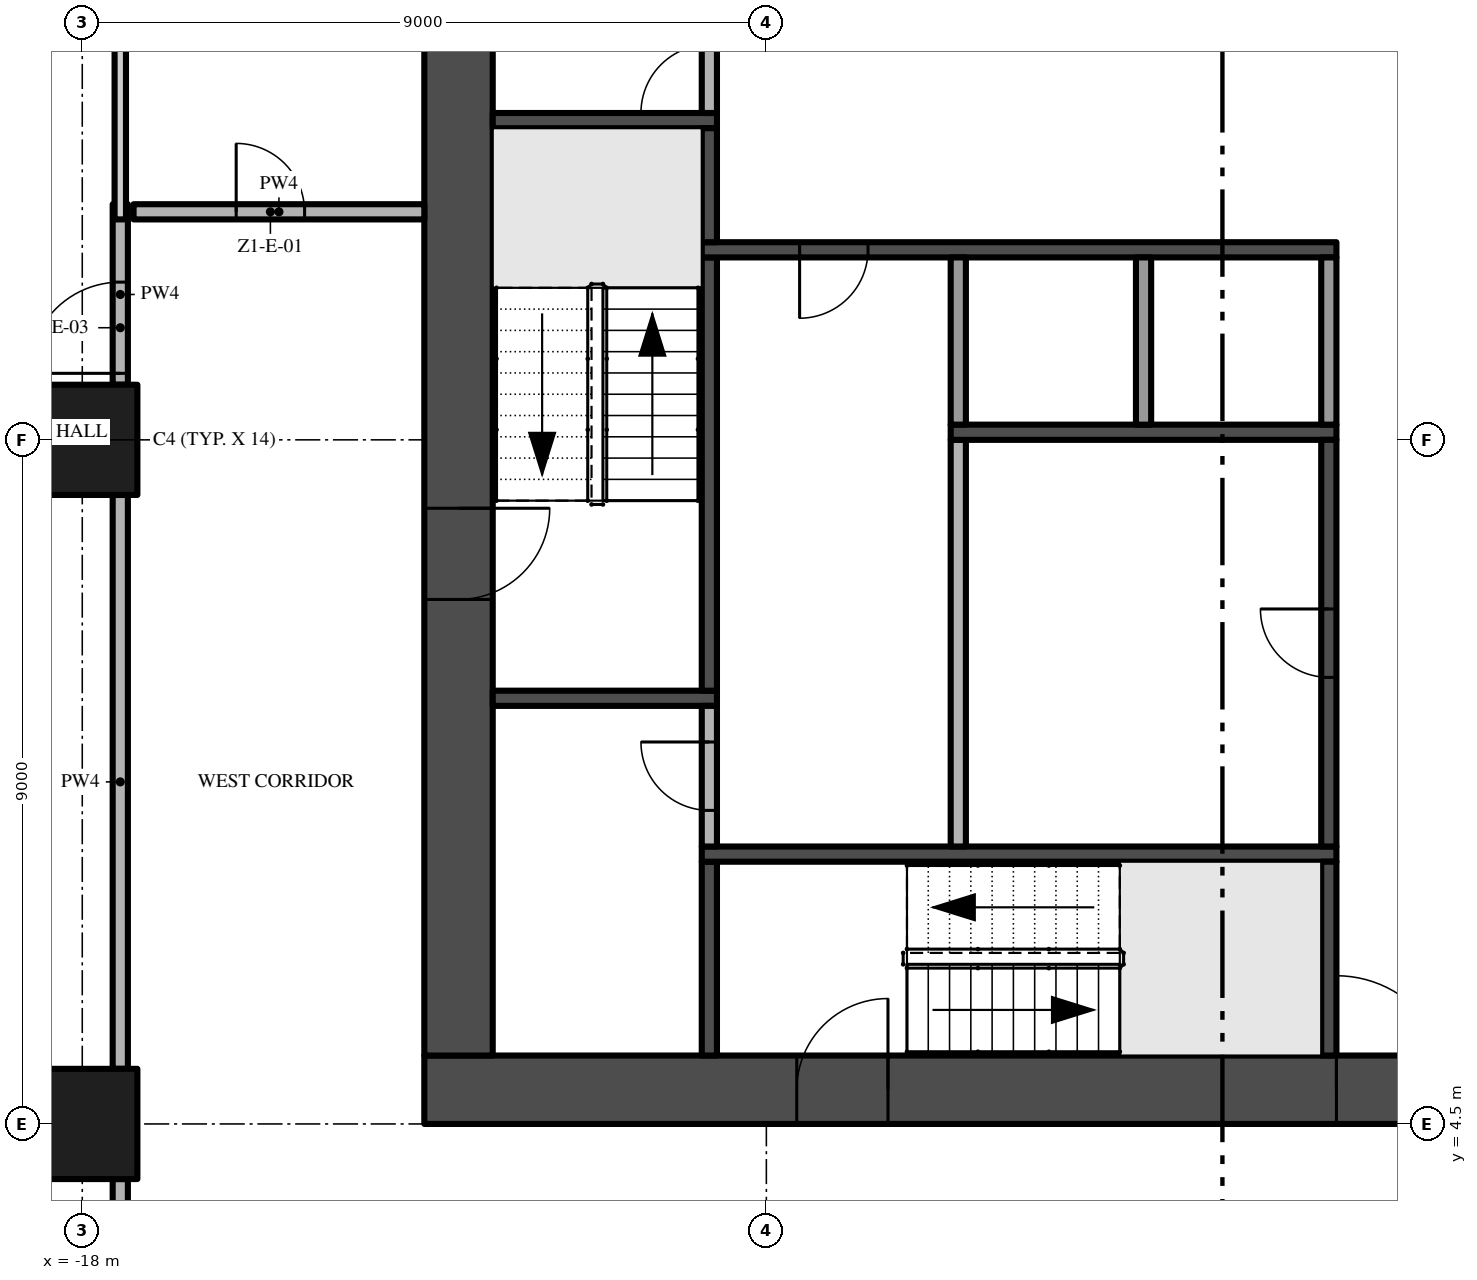
"""IFC4 building model, lengths in metres.
Left out: names, types, materials, properties, quantities, classifications, styles, units other than length and angle.
Written with IfcOpenShell. Run it as: python <this file> out.ifc"""

import sys

from ifc_helpers import new_model, si_unit, direction, frame, frame_2d, origin, origin_2d, place, context, subcontext, project, spatial, rectangle, extrude, element, fill, save


model = new_model("IFC4")
c1 = context("Model", 3, precision=1e-05, world=origin(), true_north=direction((0.0, 1.0)))
c2 = subcontext(c1, "Body", "Model", "MODEL_VIEW")
j1 = project(units=[si_unit("LENGTHUNIT", "METRE"), si_unit("PLANEANGLEUNIT", "RADIAN")], contexts=[c1])
p1 = place(None, origin())
s1 = spatial("IfcSite", under=j1, at=p1, CompositionType="ELEMENT")
p2 = place(p1, origin())
s2 = spatial("IfcBuilding", under=s1, at=p2, CompositionType="ELEMENT")
p3 = place(p2, frame((0.0, 0.0, 60.6)))
s3 = spatial("IfcBuildingStorey", under=s2, at=p3, CompositionType="ELEMENT", Elevation=60.6)
p4 = place(p3, frame((-13.5, 4.95, -0.3), z_axis=(0.0, 0.0, 1.0), x_axis=(1.0, 0.0, 0.0)))
e1 = element("IfcWall", 1, at=p4, inside=s3, PredefinedType="SHEAR", context=c2, shape_type="SweptSolid", body=[
    extrude(rectangle(XDim=27.0, YDim=0.9, at=frame_2d((13.5, 0.0))), origin(), (0.0, 0.0, 1.0), 3.8),
])
p5 = place(p4, frame((12.0, 0.0, 0.3)))
e2 = element("IfcOpeningElement", 2, at=p5, cuts=e1, PredefinedType="OPENING", context=c2, shape_type="SweptSolid", body=[
    extrude(rectangle(XDim=3.0, YDim=2.4, at=frame_2d((1.5, 1.2))), frame((0.0, 0.46, 0.0), z_axis=(0.0, -1.0, 0.0), x_axis=(1.0, 0.0, 0.0)), (0.0, 0.0, 1.0), 0.92),
])
p6 = place(p4, frame((4.9, 0.0, 0.3)))
e3 = element("IfcOpeningElement", 3, at=p6, cuts=e1, PredefinedType="OPENING", context=c2, shape_type="SweptSolid", body=[
    extrude(rectangle(XDim=1.2, YDim=2.2, at=frame_2d((0.6, 1.1))), frame((0.0, 0.46, 0.0), z_axis=(0.0, -1.0, 0.0), x_axis=(1.0, 0.0, 0.0)), (0.0, 0.0, 1.0), 0.92),
])
p7 = place(p4, frame((20.75, 0.0, 0.3)))
e4 = element("IfcOpeningElement", 4, at=p7, cuts=e1, PredefinedType="OPENING", context=c2, shape_type="SweptSolid", body=[
    extrude(rectangle(XDim=1.5, YDim=2.2, at=frame_2d((0.75, 1.1))), frame((0.0, 0.46, 0.0), z_axis=(0.0, -1.0, 0.0), x_axis=(1.0, 0.0, 0.0)), (0.0, 0.0, 1.0), 0.92),
])
p8 = place(p4, frame((17.4, 0.0, 0.3)))
e5 = element("IfcOpeningElement", 5, at=p8, cuts=e1, PredefinedType="OPENING", context=c2, shape_type="SweptSolid", body=[
    extrude(rectangle(XDim=1.2, YDim=2.2, at=frame_2d((0.6, 1.1))), frame((0.0, 0.46, 0.0), z_axis=(0.0, -1.0, 0.0), x_axis=(1.0, 0.0, 0.0)), (0.0, 0.0, 1.0), 0.92),
])
p9 = place(p3, frame((-13.05, 21.6, -0.3), z_axis=(0.0, 0.0, 1.0), x_axis=(0.0, -1.0, 0.0)))
e6 = element("IfcWall", 6, at=p9, inside=s3, PredefinedType="SHEAR", context=c2, shape_type="SweptSolid", body=[
    extrude(rectangle(XDim=16.2, YDim=0.9, at=frame_2d((8.1, 0.0))), origin(), (0.0, 0.0, 1.0), 3.8),
])
p10 = place(p9, frame((9.0, 0.0, 0.3)))
e7 = element("IfcOpeningElement", 7, at=p10, cuts=e6, PredefinedType="OPENING", context=c2, shape_type="SweptSolid", body=[
    extrude(rectangle(XDim=1.2, YDim=2.2, at=frame_2d((0.6, 1.1))), frame((0.0, 0.46, 0.0), z_axis=(0.0, -1.0, 0.0), x_axis=(1.0, 0.0, 0.0)), (0.0, 0.0, 1.0), 0.92),
])
for number, where, z_axis, x_axis in (
    (8, (-18.0, 13.5, 0.0), (0.0, 0.0, 1.0), (1.0, 0.0, 0.0)),
    (9, (-18.0, 4.5, 0.0), (0.0, 0.0, 1.0), (1.0, 0.0, 0.0)),
):
    element("IfcColumn", number, at=place(p3, frame(where, z_axis=z_axis, x_axis=x_axis)), inside=s3, PredefinedType="COLUMN", context=c2, shape_type="SweptSolid", body=[
        extrude(rectangle(XDim=1.45, YDim=1.45, at=origin_2d()), origin(), (0.0, 0.0, 1.0), 3.5),
    ])
for number, where, z_axis, x_axis in (
    (10, (-12.6, 10.1, 0.0), (0.0, 0.0, 1.0), (1.0, 0.0, 0.0)),
    (11, (-12.6, 17.7, 0.0), (0.0, 0.0, 1.0), (1.0, 0.0, 0.0)),
):
    element("IfcWall", number, at=place(p3, frame(where, z_axis=z_axis, x_axis=x_axis)), inside=s3, PredefinedType="SHEAR", context=c2, shape_type="SweptSolid", body=[
        extrude(rectangle(XDim=2.95, YDim=0.2, at=frame_2d((1.475, 0.0))), origin(), (0.0, 0.0, 1.0), 3.5),
    ])
p11 = place(p3, frame((-9.75, 5.4, 0.0), z_axis=(0.0, 0.0, 1.0), x_axis=(0.0, 1.0, 0.0)))
e12 = element("IfcWall", 12, at=p11, inside=s3, PredefinedType="SHEAR", context=c2, shape_type="SweptSolid", body=[
    extrude(rectangle(XDim=2.55, YDim=0.2, at=frame_2d((1.275, 0.0))), origin(), (0.0, 0.0, 1.0), 3.5),
])
p12 = place(p3, frame((-9.85, 8.05, 0.0), z_axis=(0.0, 0.0, 1.0), x_axis=(1.0, 0.0, 0.0)))
e13 = element("IfcWall", 13, at=p12, inside=s3, PredefinedType="SHEAR", context=c2, shape_type="SweptSolid", body=[
    extrude(rectangle(XDim=8.35, YDim=0.2, at=frame_2d((4.175, 0.0))), origin(), (0.0, 0.0, 1.0), 3.5),
])
p13 = place(p3, frame((-9.75, 8.15, 0.0), z_axis=(0.0, 0.0, 1.0), x_axis=(0.0, 1.0, 0.0)))
e14 = element("IfcWall", 14, at=p13, inside=s3, PredefinedType="PARTITIONING", context=c2, shape_type="SweptSolid", body=[
    extrude(rectangle(XDim=1.85, YDim=0.2, at=frame_2d((0.925, 0.0))), origin(), (0.0, 0.0, 1.0), 3.5),
])
p14 = place(p13, frame((0.475, 0.0, 0.0)))
e15 = element("IfcOpeningElement", 15, at=p14, cuts=e14, PredefinedType="OPENING", context=c2, shape_type="SweptSolid", body=[
    extrude(rectangle(XDim=0.9, YDim=2.1, at=frame_2d((0.45, 1.05))), frame((0.0, 0.11, 0.0), z_axis=(0.0, -1.0, 0.0), x_axis=(1.0, 0.0, 0.0)), (0.0, 0.0, 1.0), 0.22),
])
p15 = place(p3, frame((-9.75, 10.2, 0.0), z_axis=(0.0, 0.0, 1.0), x_axis=(0.0, 1.0, 0.0)))
e16 = element("IfcWall", 16, at=p15, inside=s3, PredefinedType="SHEAR", context=c2, shape_type="SweptSolid", body=[
    extrude(rectangle(XDim=5.7, YDim=0.2, at=frame_2d((2.85, 0.0))), origin(), (0.0, 0.0, 1.0), 3.5),
])
p16 = place(p3, frame((-1.5, 16.0, 0.0), z_axis=(0.0, 0.0, 1.0), x_axis=(-1.0, 0.0, 0.0)))
e17 = element("IfcWall", 17, at=p16, inside=s3, PredefinedType="SHEAR", context=c2, shape_type="SweptSolid", body=[
    extrude(rectangle(XDim=8.35, YDim=0.2, at=frame_2d((4.175, 0.0))), origin(), (0.0, 0.0, 1.0), 3.5),
])
p17 = place(p16, frame((6.162, 0.0, 0.0)))
e18 = element("IfcOpeningElement", 18, at=p17, cuts=e17, PredefinedType="OPENING", context=c2, shape_type="SweptSolid", body=[
    extrude(rectangle(XDim=0.9, YDim=2.1, at=frame_2d((0.45, 1.05))), frame((0.0, 0.11, 0.0), z_axis=(0.0, -1.0, 0.0), x_axis=(1.0, 0.0, 0.0)), (0.0, 0.0, 1.0), 0.22),
])
p18 = place(p3, frame((-9.75, 16.1, 0.0), z_axis=(0.0, 0.0, 1.0), x_axis=(0.0, 1.0, 0.0)))
e19 = element("IfcWall", 19, at=p18, inside=s3, PredefinedType="SHEAR", context=c2, shape_type="SweptSolid", body=[
    extrude(rectangle(XDim=1.5, YDim=0.2, at=frame_2d((0.75, 0.0))), origin(), (0.0, 0.0, 1.0), 3.5),
])
p19 = place(p3, frame((-9.75, 17.8, 0.0), z_axis=(0.0, 0.0, 1.0), x_axis=(0.0, 1.0, 0.0)))
e20 = element("IfcWall", 20, at=p19, inside=s3, PredefinedType="PARTITIONING", context=c2, shape_type="SweptSolid", body=[
    extrude(rectangle(XDim=1.4, YDim=0.2, at=frame_2d((0.7, 0.0))), origin(), (0.0, 0.0, 1.0), 3.5),
])
p20 = place(p19, origin())
e21 = element("IfcOpeningElement", 21, at=p20, cuts=e20, PredefinedType="OPENING", context=c2, shape_type="SweptSolid", body=[
    extrude(rectangle(XDim=0.9, YDim=2.1, at=frame_2d((0.45, 1.05))), frame((0.0, 0.11, 0.0), z_axis=(0.0, -1.0, 0.0), x_axis=(1.0, 0.0, 0.0)), (0.0, 0.0, 1.0), 0.22),
])
p21 = place(p3, frame((-6.475, 8.15, 0.0), z_axis=(0.0, 0.0, 1.0), x_axis=(0.0, 1.0, 0.0)))
e22 = element("IfcWall", 22, at=p21, inside=s3, PredefinedType="PARTITIONING", context=c2, shape_type="SweptSolid", body=[
    extrude(rectangle(XDim=5.35, YDim=0.2, at=frame_2d((2.675, 0.0))), origin(), (0.0, 0.0, 1.0), 3.5),
])
p22 = place(p3, frame((-6.575, 13.6, 0.0), z_axis=(0.0, 0.0, 1.0), x_axis=(1.0, 0.0, 0.0)))
e23 = element("IfcWall", 23, at=p22, inside=s3, PredefinedType="SHEAR", context=c2, shape_type="SweptSolid", body=[
    extrude(rectangle(XDim=5.075, YDim=0.2, at=frame_2d((2.538, 0.0))), origin(), (0.0, 0.0, 1.0), 3.5),
])
for number, where, z_axis, x_axis in (
    (24, (-6.475, 13.7, 0.0), (0.0, 0.0, 1.0), (0.0, 1.0, 0.0)),
    (25, (-4.037, 13.7, 0.0), (0.0, 0.0, 1.0), (0.0, 1.0, 0.0)),
):
    element("IfcWall", number, at=place(p3, frame(where, z_axis=z_axis, x_axis=x_axis)), inside=s3, PredefinedType="PARTITIONING", context=c2, shape_type="SweptSolid", body=[
        extrude(rectangle(XDim=2.2, YDim=0.2, at=frame_2d((1.1, 0.0))), origin(), (0.0, 0.0, 1.0), 3.5),
    ])
p23 = place(p3, frame((-1.6, 5.4, 0.0), z_axis=(0.0, 0.0, 1.0), x_axis=(0.0, 1.0, 0.0)))
e26 = element("IfcWall", 26, at=p23, inside=s3, PredefinedType="SHEAR", context=c2, shape_type="SweptSolid", body=[
    extrude(rectangle(XDim=2.55, YDim=0.2, at=frame_2d((1.275, 0.0))), origin(), (0.0, 0.0, 1.0), 3.5),
])
p24 = place(p3, frame((-1.6, 8.15, 0.0), z_axis=(0.0, 0.0, 1.0), x_axis=(0.0, 1.0, 0.0)))
e27 = element("IfcWall", 27, at=p24, inside=s3, PredefinedType="SHEAR", context=c2, shape_type="SweptSolid", body=[
    extrude(rectangle(XDim=5.35, YDim=0.2, at=frame_2d((2.675, 0.0))), origin(), (0.0, 0.0, 1.0), 3.5),
])
p25 = place(p24, frame((2.225, 0.0, 0.0)))
e28 = element("IfcOpeningElement", 28, at=p25, cuts=e27, PredefinedType="OPENING", context=c2, shape_type="SweptSolid", body=[
    extrude(rectangle(XDim=0.9, YDim=2.1, at=frame_2d((0.45, 1.05))), frame((0.0, 0.11, 0.0), z_axis=(0.0, -1.0, 0.0), x_axis=(1.0, 0.0, 0.0)), (0.0, 0.0, 1.0), 0.22),
])
p26 = place(p3, frame((-1.6, 13.7, 0.0), z_axis=(0.0, 0.0, 1.0), x_axis=(0.0, 1.0, 0.0)))
e29 = element("IfcWall", 29, at=p26, inside=s3, PredefinedType="PARTITIONING", context=c2, shape_type="SweptSolid", body=[
    extrude(rectangle(XDim=2.2, YDim=0.2, at=frame_2d((1.1, 0.0))), origin(), (0.0, 0.0, 1.0), 3.5),
])
p27 = place(p3, frame((-17.325, 16.5, 0.0), z_axis=(0.0, 0.0, 1.0), x_axis=(1.0, 0.0, 0.0)))
e30 = element("IfcWall", 30, at=p27, inside=s3, PredefinedType="PARTITIONING", context=c2, shape_type="SweptSolid", body=[
    extrude(rectangle(XDim=3.825, YDim=0.2, at=frame_2d((1.913, 0.0))), origin(), (0.0, 0.0, 1.0), 3.5),
])
p28 = place(p27, frame((1.35, 0.0, 0.0)))
e31 = element("IfcOpeningElement", 31, at=p28, cuts=e30, PredefinedType="OPENING", context=c2, shape_type="SweptSolid", body=[
    extrude(rectangle(XDim=0.9, YDim=2.1, at=frame_2d((0.45, 1.05))), frame((0.0, 0.11, 0.0), z_axis=(0.0, -1.0, 0.0), x_axis=(1.0, 0.0, 0.0)), (0.0, 0.0, 1.0), 0.22),
])
p29 = place(p3, frame((-17.5, -0.2, 0.0), z_axis=(0.0, 0.0, 1.0), x_axis=(0.0, 1.0, 0.0)))
e32 = element("IfcWall", 32, at=p29, inside=s3, PredefinedType="PARTITIONING", context=c2, shape_type="SweptSolid", body=[
    extrude(rectangle(XDim=3.975, YDim=0.2, at=frame_2d((1.988, 0.0))), origin(), (0.0, 0.0, 1.0), 3.5),
])
p30 = place(p3, frame((-17.5, 5.225, 0.0), z_axis=(0.0, 0.0, 1.0), x_axis=(0.0, 1.0, 0.0)))
e33 = element("IfcWall", 33, at=p30, inside=s3, PredefinedType="PARTITIONING", context=c2, shape_type="SweptSolid", body=[
    extrude(rectangle(XDim=7.55, YDim=0.2, at=frame_2d((3.775, 0.0))), origin(), (0.0, 0.0, 1.0), 3.5),
])
p31 = place(p3, frame((-17.5, 14.225, 0.0), z_axis=(0.0, 0.0, 1.0), x_axis=(0.0, 1.0, 0.0)))
e34 = element("IfcWall", 34, at=p31, inside=s3, PredefinedType="PARTITIONING", context=c2, shape_type="SweptSolid", body=[
    extrude(rectangle(XDim=2.375, YDim=0.2, at=frame_2d((1.188, 0.0))), origin(), (0.0, 0.0, 1.0), 3.5),
])
p32 = place(p31, frame((0.15, 0.0, 0.0)))
e35 = element("IfcOpeningElement", 35, at=p32, cuts=e34, PredefinedType="OPENING", context=c2, shape_type="SweptSolid", body=[
    extrude(rectangle(XDim=1.2, YDim=2.4, at=frame_2d((0.6, 1.2))), frame((0.0, 0.11, 0.0), z_axis=(0.0, -1.0, 0.0), x_axis=(1.0, 0.0, 0.0)), (0.0, 0.0, 1.0), 0.22),
])
p33 = place(p3, frame((-17.5, 16.4, 0.0), z_axis=(0.0, 0.0, 1.0), x_axis=(0.0, 1.0, 0.0)))
e36 = element("IfcWall", 36, at=p33, inside=s3, PredefinedType="PARTITIONING", context=c2, shape_type="SweptSolid", body=[
    extrude(rectangle(XDim=4.75, YDim=0.15, at=frame_2d((2.375, 0.0))), origin(), (0.0, 0.0, 1.0), 3.5),
])
p34 = place(p5, frame((3.0, 0.0, 0.0), z_axis=(0.0, 0.0, 1.0), x_axis=(-1.0, 0.0, 0.0)))
e37 = element("IfcDoor", 37, at=p34, inside=s3, OperationType="DOUBLE_DOOR_SINGLE_SWING", PredefinedType="DOOR", context=c2, shape_type="SweptSolid", body=[
    extrude(rectangle(XDim=3.0, YDim=2.4, at=frame_2d((1.5, 1.2))), frame((0.0, 0.025, 0.0), z_axis=(0.0, -1.0, 0.0), x_axis=(1.0, 0.0, 0.0)), (0.0, 0.0, 1.0), 0.05),
])
fill(e2, e37)
p35 = place(p10, frame((1.2, 0.0, 0.0), z_axis=(0.0, 0.0, 1.0), x_axis=(-1.0, 0.0, 0.0)))
e38 = element("IfcDoor", 38, at=p35, inside=s3, OperationType="SINGLE_SWING_RIGHT", PredefinedType="DOOR", context=c2, shape_type="SweptSolid", body=[
    extrude(rectangle(XDim=1.2, YDim=2.2, at=frame_2d((0.6, 1.1))), frame((0.0, 0.025, 0.0), z_axis=(0.0, -1.0, 0.0), x_axis=(1.0, 0.0, 0.0)), (0.0, 0.0, 1.0), 0.05),
])
fill(e7, e38)
p36 = place(p6, frame((1.2, 0.0, 0.0), z_axis=(0.0, 0.0, 1.0), x_axis=(-1.0, 0.0, 0.0)))
e39 = element("IfcDoor", 39, at=p36, inside=s3, OperationType="SINGLE_SWING_LEFT", PredefinedType="DOOR", context=c2, shape_type="SweptSolid", body=[
    extrude(rectangle(XDim=1.2, YDim=2.2, at=frame_2d((0.6, 1.1))), frame((0.0, 0.025, 0.0), z_axis=(0.0, -1.0, 0.0), x_axis=(1.0, 0.0, 0.0)), (0.0, 0.0, 1.0), 0.05),
])
fill(e3, e39)
p37 = place(p17, origin())
e40 = element("IfcDoor", 40, at=p37, inside=s3, OperationType="SINGLE_SWING_RIGHT", PredefinedType="DOOR", context=c2, shape_type="SweptSolid", body=[
    extrude(rectangle(XDim=0.9, YDim=2.1, at=frame_2d((0.45, 1.05))), frame((0.0, 0.025, 0.0), z_axis=(0.0, -1.0, 0.0), x_axis=(1.0, 0.0, 0.0)), (0.0, 0.0, 1.0), 0.05),
])
fill(e18, e40)
p38 = place(p25, origin())
e41 = element("IfcDoor", 41, at=p38, inside=s3, OperationType="SINGLE_SWING_RIGHT", PredefinedType="DOOR", context=c2, shape_type="SweptSolid", body=[
    extrude(rectangle(XDim=0.9, YDim=2.1, at=frame_2d((0.45, 1.05))), frame((0.0, 0.025, 0.0), z_axis=(0.0, -1.0, 0.0), x_axis=(1.0, 0.0, 0.0)), (0.0, 0.0, 1.0), 0.05),
])
fill(e28, e41)
p39 = place(p20, origin())
e42 = element("IfcDoor", 42, at=p39, inside=s3, OperationType="SINGLE_SWING_LEFT", PredefinedType="DOOR", context=c2, shape_type="SweptSolid", body=[
    extrude(rectangle(XDim=0.9, YDim=2.1, at=frame_2d((0.45, 1.05))), frame((0.0, 0.025, 0.0), z_axis=(0.0, -1.0, 0.0), x_axis=(1.0, 0.0, 0.0)), (0.0, 0.0, 1.0), 0.05),
])
fill(e21, e42)
p40 = place(p14, origin())
e43 = element("IfcDoor", 43, at=p40, inside=s3, OperationType="SINGLE_SWING_RIGHT", PredefinedType="DOOR", context=c2, shape_type="SweptSolid", body=[
    extrude(rectangle(XDim=0.9, YDim=2.1, at=frame_2d((0.45, 1.05))), frame((0.0, 0.025, 0.0), z_axis=(0.0, -1.0, 0.0), x_axis=(1.0, 0.0, 0.0)), (0.0, 0.0, 1.0), 0.05),
])
fill(e15, e43)
p41 = place(p28, origin())
e44 = element("IfcDoor", 44, at=p41, inside=s3, OperationType="SINGLE_SWING_LEFT", PredefinedType="DOOR", context=c2, shape_type="SweptSolid", body=[
    extrude(rectangle(XDim=0.9, YDim=2.1, at=frame_2d((0.45, 1.05))), frame((0.0, 0.025, 0.0), z_axis=(0.0, -1.0, 0.0), x_axis=(1.0, 0.0, 0.0)), (0.0, 0.0, 1.0), 0.05),
])
fill(e31, e44)
p42 = place(p32, origin())
e45 = element("IfcDoor", 45, at=p42, inside=s3, OperationType="SINGLE_SWING_LEFT", PredefinedType="DOOR", context=c2, shape_type="SweptSolid", body=[
    extrude(rectangle(XDim=1.2, YDim=2.4, at=frame_2d((0.6, 1.2))), frame((0.0, 0.025, 0.0), z_axis=(0.0, -1.0, 0.0), x_axis=(1.0, 0.0, 0.0)), (0.0, 0.0, 1.0), 0.05),
])
fill(e35, e45)
save(model, sys.argv[1])
